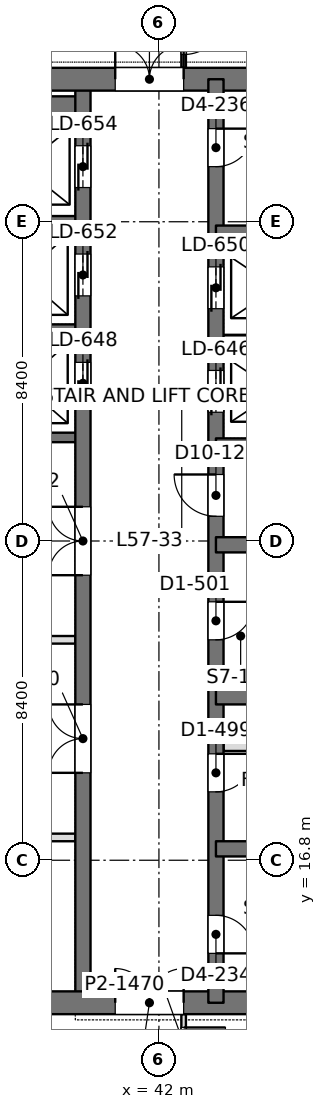
"""IFC4 building model, lengths in metres.
Left out: names, types, materials, properties, quantities, classifications, styles, units other than length and angle.
Written with IfcOpenShell. Run it as: python <this file> out.ifc"""

import sys

from ifc_helpers import new_model, si_unit, direction, frame, frame_2d, origin, place, context, subcontext, project, spatial, rectangle, extrude, element, fill, save


model = new_model("IFC4")
c1 = context("Model", 3, precision=1e-05, world=origin(), true_north=direction((0.0, 1.0)))
c2 = subcontext(c1, "Body", "Model", "MODEL_VIEW")
j1 = project(units=[si_unit("LENGTHUNIT", "METRE"), si_unit("PLANEANGLEUNIT", "RADIAN")], contexts=[c1])
p1 = place(None, origin())
s1 = spatial("IfcSite", under=j1, at=p1, CompositionType="ELEMENT")
p2 = place(p1, origin())
s2 = spatial("IfcBuilding", under=s1, at=p2, CompositionType="ELEMENT")
p3 = place(p2, frame((0.0, 0.0, 250.2)))
s3 = spatial("IfcBuildingStorey", under=s2, at=p3, CompositionType="ELEMENT", Elevation=250.2)
p4 = place(p3, frame((33.75, 13.05, 0.0), z_axis=(0.0, 0.0, 1.0), x_axis=(1.0, 0.0, 0.0)))
e1 = element("IfcWall", 1, at=p4, inside=s3, PredefinedType="SHEAR", context=c2, shape_type="SweptSolid", body=[
    extrude(rectangle(XDim=17.7, YDim=0.6, at=frame_2d((8.85, 0.0))), origin(), (0.0, 0.0, 1.0), 4.5),
])
p5 = place(p4, frame((7.1, 0.0, 0.0)))
e2 = element("IfcOpeningElement", 2, at=p5, cuts=e1, PredefinedType="OPENING", context=c2, shape_type="SweptSolid", body=[
    extrude(rectangle(XDim=1.8, YDim=2.4, at=frame_2d((0.9, 1.2))), frame((0.0, 0.31, 0.0), z_axis=(0.0, -1.0, 0.0), x_axis=(1.0, 0.0, 0.0)), (0.0, 0.0, 1.0), 0.62),
])
p6 = place(p3, frame((33.75, 37.35, 0.0), z_axis=(0.0, 0.0, 1.0), x_axis=(1.0, 0.0, 0.0)))
e3 = element("IfcWall", 3, at=p6, inside=s3, PredefinedType="SHEAR", context=c2, shape_type="SweptSolid", body=[
    extrude(rectangle(XDim=17.7, YDim=0.6, at=frame_2d((8.85, 0.0))), origin(), (0.0, 0.0, 1.0), 4.5),
])
p7 = place(p6, frame((7.1, 0.0, 0.0)))
e4 = element("IfcOpeningElement", 4, at=p7, cuts=e3, PredefinedType="OPENING", context=c2, shape_type="SweptSolid", body=[
    extrude(rectangle(XDim=1.8, YDim=2.4, at=frame_2d((0.9, 1.2))), frame((0.0, 0.31, 0.0), z_axis=(0.0, -1.0, 0.0), x_axis=(1.0, 0.0, 0.0)), (0.0, 0.0, 1.0), 0.62),
])
p8 = place(p3, frame((43.5, 13.05, 0.0), z_axis=(0.0, 0.0, 1.0), x_axis=(0.0, 1.0, 0.0)))
e5 = element("IfcWall", 5, at=p8, inside=s3, PredefinedType="SHEAR", context=c2, shape_type="SweptSolid", body=[
    extrude(rectangle(XDim=24.3, YDim=0.4, at=frame_2d((12.15, 0.0))), origin(), (0.0, 0.0, 1.0), 4.5),
])
p9 = place(p8, frame((1.3, 0.0, 0.0)))
e6 = element("IfcOpeningElement", 6, at=p9, cuts=e5, PredefinedType="OPENING", context=c2, shape_type="SweptSolid", body=[
    extrude(rectangle(XDim=1.0, YDim=2.2, at=frame_2d((0.5, 1.1))), frame((0.0, 0.21, 0.0), z_axis=(0.0, -1.0, 0.0), x_axis=(1.0, 0.0, 0.0)), (0.0, 0.0, 1.0), 0.42),
])
p10 = place(p8, frame((22.0, 0.0, 0.0)))
e7 = element("IfcOpeningElement", 7, at=p10, cuts=e5, PredefinedType="OPENING", context=c2, shape_type="SweptSolid", body=[
    extrude(rectangle(XDim=1.0, YDim=2.2, at=frame_2d((0.5, 1.1))), frame((0.0, 0.21, 0.0), z_axis=(0.0, -1.0, 0.0), x_axis=(1.0, 0.0, 0.0)), (0.0, 0.0, 1.0), 0.42),
])
p11 = place(p8, frame((5.55, 0.0, 0.0)))
e8 = element("IfcOpeningElement", 8, at=p11, cuts=e5, PredefinedType="OPENING", context=c2, shape_type="SweptSolid", body=[
    extrude(rectangle(XDim=1.0, YDim=2.2, at=frame_2d((0.5, 1.1))), frame((0.0, 0.21, 0.0), z_axis=(0.0, -1.0, 0.0), x_axis=(1.0, 0.0, 0.0)), (0.0, 0.0, 1.0), 0.42),
])
p12 = place(p8, frame((9.55, 0.0, 0.0)))
e9 = element("IfcOpeningElement", 9, at=p12, cuts=e5, PredefinedType="OPENING", context=c2, shape_type="SweptSolid", body=[
    extrude(rectangle(XDim=1.0, YDim=2.2, at=frame_2d((0.5, 1.1))), frame((0.0, 0.21, 0.0), z_axis=(0.0, -1.0, 0.0), x_axis=(1.0, 0.0, 0.0)), (0.0, 0.0, 1.0), 0.42),
])
p13 = place(p8, frame((12.8, 0.0, 0.0)))
e10 = element("IfcOpeningElement", 10, at=p13, cuts=e5, PredefinedType="OPENING", context=c2, shape_type="SweptSolid", body=[
    extrude(rectangle(XDim=1.1, YDim=2.2, at=frame_2d((0.55, 1.1))), frame((0.0, 0.21, 0.0), z_axis=(0.0, -1.0, 0.0), x_axis=(1.0, 0.0, 0.0)), (0.0, 0.0, 1.0), 0.42),
])
p14 = place(p8, frame((15.538, 0.0, 0.0)))
e11 = element("IfcOpeningElement", 11, at=p14, cuts=e5, PredefinedType="OPENING", context=c2, shape_type="SweptSolid", body=[
    extrude(rectangle(XDim=1.1, YDim=2.2, at=frame_2d((0.55, 1.1))), frame((0.0, 0.21, 0.0), z_axis=(0.0, -1.0, 0.0), x_axis=(1.0, 0.0, 0.0)), (0.0, 0.0, 1.0), 0.42),
])
p15 = place(p8, frame((18.262, 0.0, 0.0)))
e12 = element("IfcOpeningElement", 12, at=p15, cuts=e5, PredefinedType="OPENING", context=c2, shape_type="SweptSolid", body=[
    extrude(rectangle(XDim=1.1, YDim=2.2, at=frame_2d((0.55, 1.1))), frame((0.0, 0.21, 0.0), z_axis=(0.0, -1.0, 0.0), x_axis=(1.0, 0.0, 0.0)), (0.0, 0.0, 1.0), 0.42),
])
p16 = place(p3, frame((40.0, 13.05, 0.0), z_axis=(0.0, 0.0, 1.0), x_axis=(0.0, 1.0, 0.0)))
e13 = element("IfcWall", 13, at=p16, inside=s3, PredefinedType="SHEAR", context=c2, shape_type="SweptSolid", body=[
    extrude(rectangle(XDim=24.3, YDim=0.4, at=frame_2d((12.15, 0.0))), origin(), (0.0, 0.0, 1.0), 4.5),
])
p17 = place(p16, frame((15.75, 0.0, 0.0)))
e14 = element("IfcOpeningElement", 14, at=p17, cuts=e13, PredefinedType="OPENING", context=c2, shape_type="SweptSolid", body=[
    extrude(rectangle(XDim=1.1, YDim=2.2, at=frame_2d((0.55, 1.1))), frame((0.0, 0.21, 0.0), z_axis=(0.0, -1.0, 0.0), x_axis=(1.0, 0.0, 0.0)), (0.0, 0.0, 1.0), 0.42),
])
p18 = place(p16, frame((18.6, 0.0, 0.0)))
e15 = element("IfcOpeningElement", 15, at=p18, cuts=e13, PredefinedType="OPENING", context=c2, shape_type="SweptSolid", body=[
    extrude(rectangle(XDim=1.1, YDim=2.2, at=frame_2d((0.55, 1.1))), frame((0.0, 0.21, 0.0), z_axis=(0.0, -1.0, 0.0), x_axis=(1.0, 0.0, 0.0)), (0.0, 0.0, 1.0), 0.42),
])
p19 = place(p16, frame((21.45, 0.0, 0.0)))
e16 = element("IfcOpeningElement", 16, at=p19, cuts=e13, PredefinedType="OPENING", context=c2, shape_type="SweptSolid", body=[
    extrude(rectangle(XDim=1.1, YDim=2.2, at=frame_2d((0.55, 1.1))), frame((0.0, 0.21, 0.0), z_axis=(0.0, -1.0, 0.0), x_axis=(1.0, 0.0, 0.0)), (0.0, 0.0, 1.0), 0.42),
])
p20 = place(p16, frame((6.05, 0.0, 0.0)))
e17 = element("IfcOpeningElement", 17, at=p20, cuts=e13, PredefinedType="OPENING", context=c2, shape_type="SweptSolid", body=[
    extrude(rectangle(XDim=1.8, YDim=2.4, at=frame_2d((0.9, 1.2))), frame((0.0, 0.21, 0.0), z_axis=(0.0, -1.0, 0.0), x_axis=(1.0, 0.0, 0.0)), (0.0, 0.0, 1.0), 0.42),
])
p21 = place(p16, frame((11.25, 0.0, 0.0)))
e18 = element("IfcOpeningElement", 18, at=p21, cuts=e13, PredefinedType="OPENING", context=c2, shape_type="SweptSolid", body=[
    extrude(rectangle(XDim=1.8, YDim=2.4, at=frame_2d((0.9, 1.2))), frame((0.0, 0.21, 0.0), z_axis=(0.0, -1.0, 0.0), x_axis=(1.0, 0.0, 0.0)), (0.0, 0.0, 1.0), 0.42),
])
for number, where, z_axis, x_axis in (
    (19, (51.15, 17.1, 0.0), (0.0, 0.0, 1.0), (-1.0, 0.0, 0.0)),
    (20, (51.15, 21.1, 0.0), (0.0, 0.0, 1.0), (-1.0, 0.0, 0.0)),
    (21, (51.15, 25.1, 0.0), (0.0, 0.0, 1.0), (-1.0, 0.0, 0.0)),
    (22, (51.15, 27.7, 0.0), (0.0, 0.0, 1.0), (-1.0, 0.0, 0.0)),
    (23, (51.15, 33.3, 0.0), (0.0, 0.0, 1.0), (-1.0, 0.0, 0.0)),
):
    element("IfcWall", number, at=place(p3, frame(where, z_axis=z_axis, x_axis=x_axis)), inside=s3, PredefinedType="SHEAR", context=c2, shape_type="SweptSolid", body=[
        extrude(rectangle(XDim=7.65, YDim=0.4, at=frame_2d((3.825, 0.0))), origin(), (0.0, 0.0, 1.0), 4.5),
    ])
p22 = place(p3, frame((46.7, 30.5, 0.0), z_axis=(0.0, 0.0, 1.0), x_axis=(-1.0, 0.0, 0.0)))
e24 = element("IfcWall", 24, at=p22, inside=s3, PredefinedType="SHEAR", context=c2, shape_type="SweptSolid", body=[
    extrude(rectangle(XDim=3.2, YDim=0.25, at=frame_2d((1.6, 0.0))), origin(), (0.0, 0.0, 1.0), 4.5),
])
p23 = place(p3, frame((40.0, 27.925, 0.0), z_axis=(0.0, 0.0, 1.0), x_axis=(-1.0, 0.0, 0.0)))
e25 = element("IfcWall", 25, at=p23, inside=s3, PredefinedType="SHEAR", context=c2, shape_type="SweptSolid", body=[
    extrude(rectangle(XDim=5.95, YDim=0.25, at=frame_2d((2.975, 0.0))), origin(), (0.0, 0.0, 1.0), 4.5),
])
for number, where, z_axis, x_axis in (
    (26, (40.0, 30.775, 0.0), (0.0, 0.0, 1.0), (-1.0, 0.0, 0.0)),
    (27, (40.0, 33.625, 0.0), (0.0, 0.0, 1.0), (-1.0, 0.0, 0.0)),
):
    element("IfcWall", number, at=place(p3, frame(where, z_axis=z_axis, x_axis=x_axis)), inside=s3, PredefinedType="SHEAR", context=c2, shape_type="SweptSolid", body=[
        extrude(rectangle(XDim=3.2, YDim=0.25, at=frame_2d((1.6, 0.0))), origin(), (0.0, 0.0, 1.0), 4.5),
    ])
p24 = place(p3, frame((40.0, 36.625, 0.0), z_axis=(0.0, 0.0, 1.0), x_axis=(-1.0, 0.0, 0.0)))
e28 = element("IfcWall", 28, at=p24, inside=s3, PredefinedType="SHEAR", context=c2, shape_type="SweptSolid", body=[
    extrude(rectangle(XDim=3.2, YDim=0.55, at=frame_2d((1.6, 0.0))), origin(), (0.0, 0.0, 1.0), 4.5),
])
p25 = place(p3, frame((33.898, 17.4, 0.0), z_axis=(0.0, 0.0, 1.0), x_axis=(1.0, 0.0, 0.0)))
e29 = element("IfcWall", 29, at=p25, inside=s3, PredefinedType="PARTITIONING", context=c2, shape_type="SweptSolid", body=[
    extrude(rectangle(XDim=5.904, YDim=0.2, at=frame_2d((2.952, 0.0))), origin(), (0.0, 0.0, 1.0), 3.8),
])
p26 = place(p3, frame((34.749, 22.6, 0.0), z_axis=(0.0, 0.0, 1.0), x_axis=(1.0, 0.0, 0.0)))
e30 = element("IfcWall", 30, at=p26, inside=s3, PredefinedType="PARTITIONING", context=c2, shape_type="SweptSolid", body=[
    extrude(rectangle(XDim=5.053, YDim=0.2, at=frame_2d((2.526, 0.0))), origin(), (0.0, 0.0, 1.0), 4.35),
])
p27 = place(p3, frame((42.65, 11.198, 0.0), z_axis=(0.0, 0.0, 1.0), x_axis=(0.0, 1.0, 0.0)))
e31 = element("IfcWall", 31, at=p27, inside=s3, PredefinedType="PARTITIONING", context=c2, shape_type="SweptSolid", body=[
    extrude(rectangle(XDim=1.554, YDim=0.12, at=frame_2d((0.777, 0.0))), origin(), (0.0, 0.0, 1.0), 4.35),
])
p28 = place(p27, frame((0.102, 0.0, 0.0)))
e32 = element("IfcOpeningElement", 32, at=p28, cuts=e31, PredefinedType="OPENING", context=c2, shape_type="SweptSolid", body=[
    extrude(rectangle(XDim=1.1, YDim=2.4, at=frame_2d((0.55, 1.2))), frame((0.0, 0.07, 0.0), z_axis=(0.0, -1.0, 0.0), x_axis=(1.0, 0.0, 0.0)), (0.0, 0.0, 1.0), 0.14),
])
p29 = place(p3, frame((42.65, 37.648, 0.0), z_axis=(0.0, 0.0, 1.0), x_axis=(0.0, 1.0, 0.0)))
e33 = element("IfcWall", 33, at=p29, inside=s3, PredefinedType="PARTITIONING", context=c2, shape_type="SweptSolid", body=[
    extrude(rectangle(XDim=1.554, YDim=0.12, at=frame_2d((0.777, 0.0))), origin(), (0.0, 0.0, 1.0), 4.35),
])
p30 = place(p29, frame((0.352, 0.0, 0.0)))
e34 = element("IfcOpeningElement", 34, at=p30, cuts=e33, PredefinedType="OPENING", context=c2, shape_type="SweptSolid", body=[
    extrude(rectangle(XDim=1.1, YDim=2.4, at=frame_2d((0.55, 1.2))), frame((0.0, 0.07, 0.0), z_axis=(0.0, -1.0, 0.0), x_axis=(1.0, 0.0, 0.0)), (0.0, 0.0, 1.0), 0.14),
])
p31 = place(p3, frame((43.7, 19.8, 0.0), z_axis=(0.0, 0.0, 1.0), x_axis=(1.0, 0.0, 0.0)))
e35 = element("IfcWall", 35, at=p31, inside=s3, PredefinedType="PARTITIONING", context=c2, shape_type="SweptSolid", body=[
    extrude(rectangle(XDim=6.75, YDim=0.25, at=frame_2d((3.375, 0.0))), origin(), (0.0, 0.0, 1.0), 4.3),
])
p32 = place(p31, frame((2.9, 0.0, 0.0)))
e36 = element("IfcOpeningElement", 36, at=p32, cuts=e35, PredefinedType="OPENING", context=c2, shape_type="SweptSolid", body=[
    extrude(rectangle(XDim=0.9, YDim=2.2, at=frame_2d((0.45, 1.1))), frame((0.0, 0.135, 0.0), z_axis=(0.0, -1.0, 0.0), x_axis=(1.0, 0.0, 0.0)), (0.0, 0.0, 1.0), 0.27),
])
p33 = place(p5, origin())
e37 = element("IfcDoor", 37, at=p33, inside=s3, OperationType="DOUBLE_DOOR_SINGLE_SWING", PredefinedType="DOOR", context=c2, shape_type="SweptSolid", body=[
    extrude(rectangle(XDim=1.8, YDim=2.4, at=frame_2d((0.9, 1.2))), frame((0.0, 0.025, 0.0), z_axis=(0.0, -1.0, 0.0), x_axis=(1.0, 0.0, 0.0)), (0.0, 0.0, 1.0), 0.05),
])
fill(e2, e37)
p34 = place(p7, origin())
e38 = element("IfcDoor", 38, at=p34, inside=s3, OperationType="DOUBLE_DOOR_SINGLE_SWING", PredefinedType="DOOR", context=c2, shape_type="SweptSolid", body=[
    extrude(rectangle(XDim=1.8, YDim=2.4, at=frame_2d((0.9, 1.2))), frame((0.0, 0.025, 0.0), z_axis=(0.0, -1.0, 0.0), x_axis=(1.0, 0.0, 0.0)), (0.0, 0.0, 1.0), 0.05),
])
fill(e4, e38)
p35 = place(p9, frame((1.0, 0.0, 0.0), z_axis=(0.0, 0.0, 1.0), x_axis=(-1.0, 0.0, 0.0)))
e39 = element("IfcDoor", 39, at=p35, inside=s3, OperationType="SINGLE_SWING_RIGHT", PredefinedType="DOOR", context=c2, shape_type="SweptSolid", body=[
    extrude(rectangle(XDim=1.0, YDim=2.2, at=frame_2d((0.5, 1.1))), frame((0.0, 0.025, 0.0), z_axis=(0.0, -1.0, 0.0), x_axis=(1.0, 0.0, 0.0)), (0.0, 0.0, 1.0), 0.05),
])
fill(e6, e39)
p36 = place(p10, frame((1.0, 0.0, 0.0), z_axis=(0.0, 0.0, 1.0), x_axis=(-1.0, 0.0, 0.0)))
e40 = element("IfcDoor", 40, at=p36, inside=s3, OperationType="SINGLE_SWING_LEFT", PredefinedType="DOOR", context=c2, shape_type="SweptSolid", body=[
    extrude(rectangle(XDim=1.0, YDim=2.2, at=frame_2d((0.5, 1.1))), frame((0.0, 0.025, 0.0), z_axis=(0.0, -1.0, 0.0), x_axis=(1.0, 0.0, 0.0)), (0.0, 0.0, 1.0), 0.05),
])
fill(e7, e40)
p37 = place(p11, frame((1.0, 0.0, 0.0), z_axis=(0.0, 0.0, 1.0), x_axis=(-1.0, 0.0, 0.0)))
e41 = element("IfcDoor", 41, at=p37, inside=s3, OperationType="SINGLE_SWING_LEFT", PredefinedType="DOOR", context=c2, shape_type="SweptSolid", body=[
    extrude(rectangle(XDim=1.0, YDim=2.2, at=frame_2d((0.5, 1.1))), frame((0.0, 0.025, 0.0), z_axis=(0.0, -1.0, 0.0), x_axis=(1.0, 0.0, 0.0)), (0.0, 0.0, 1.0), 0.05),
])
fill(e8, e41)
p38 = place(p12, frame((1.0, 0.0, 0.0), z_axis=(0.0, 0.0, 1.0), x_axis=(-1.0, 0.0, 0.0)))
e42 = element("IfcDoor", 42, at=p38, inside=s3, OperationType="SINGLE_SWING_LEFT", PredefinedType="DOOR", context=c2, shape_type="SweptSolid", body=[
    extrude(rectangle(XDim=1.0, YDim=2.2, at=frame_2d((0.5, 1.1))), frame((0.0, 0.025, 0.0), z_axis=(0.0, -1.0, 0.0), x_axis=(1.0, 0.0, 0.0)), (0.0, 0.0, 1.0), 0.05),
])
fill(e9, e42)
p39 = place(p13, origin())
e43 = element("IfcDoor", 43, at=p39, inside=s3, OperationType="SINGLE_SWING_RIGHT", PredefinedType="DOOR", context=c2, shape_type="SweptSolid", body=[
    extrude(rectangle(XDim=1.1, YDim=2.2, at=frame_2d((0.55, 1.1))), frame((0.0, 0.025, 0.0), z_axis=(0.0, -1.0, 0.0), x_axis=(1.0, 0.0, 0.0)), (0.0, 0.0, 1.0), 0.05),
])
fill(e10, e43)
p40 = place(p17, origin())
e44 = element("IfcDoor", 44, at=p40, inside=s3, OperationType="DOUBLE_DOOR_SLIDING", PredefinedType="DOOR", context=c2, shape_type="SweptSolid", body=[
    extrude(rectangle(XDim=1.1, YDim=2.2, at=frame_2d((0.55, 1.1))), frame((0.0, 0.025, 0.0), z_axis=(0.0, -1.0, 0.0), x_axis=(1.0, 0.0, 0.0)), (0.0, 0.0, 1.0), 0.05),
])
fill(e14, e44)
p41 = place(p18, origin())
e45 = element("IfcDoor", 45, at=p41, inside=s3, OperationType="DOUBLE_DOOR_SLIDING", PredefinedType="DOOR", context=c2, shape_type="SweptSolid", body=[
    extrude(rectangle(XDim=1.1, YDim=2.2, at=frame_2d((0.55, 1.1))), frame((0.0, 0.025, 0.0), z_axis=(0.0, -1.0, 0.0), x_axis=(1.0, 0.0, 0.0)), (0.0, 0.0, 1.0), 0.05),
])
fill(e15, e45)
p42 = place(p19, origin())
e46 = element("IfcDoor", 46, at=p42, inside=s3, OperationType="DOUBLE_DOOR_SLIDING", PredefinedType="DOOR", context=c2, shape_type="SweptSolid", body=[
    extrude(rectangle(XDim=1.1, YDim=2.2, at=frame_2d((0.55, 1.1))), frame((0.0, 0.025, 0.0), z_axis=(0.0, -1.0, 0.0), x_axis=(1.0, 0.0, 0.0)), (0.0, 0.0, 1.0), 0.05),
])
fill(e16, e46)
p43 = place(p14, origin())
e47 = element("IfcDoor", 47, at=p43, inside=s3, OperationType="DOUBLE_DOOR_SLIDING", PredefinedType="DOOR", context=c2, shape_type="SweptSolid", body=[
    extrude(rectangle(XDim=1.1, YDim=2.2, at=frame_2d((0.55, 1.1))), frame((0.0, 0.025, 0.0), z_axis=(0.0, -1.0, 0.0), x_axis=(1.0, 0.0, 0.0)), (0.0, 0.0, 1.0), 0.05),
])
fill(e11, e47)
p44 = place(p15, origin())
e48 = element("IfcDoor", 48, at=p44, inside=s3, OperationType="DOUBLE_DOOR_SLIDING", PredefinedType="DOOR", context=c2, shape_type="SweptSolid", body=[
    extrude(rectangle(XDim=1.1, YDim=2.2, at=frame_2d((0.55, 1.1))), frame((0.0, 0.025, 0.0), z_axis=(0.0, -1.0, 0.0), x_axis=(1.0, 0.0, 0.0)), (0.0, 0.0, 1.0), 0.05),
])
fill(e12, e48)
p45 = place(p20, origin())
e49 = element("IfcDoor", 49, at=p45, inside=s3, OperationType="DOUBLE_DOOR_SINGLE_SWING", PredefinedType="DOOR", context=c2, shape_type="SweptSolid", body=[
    extrude(rectangle(XDim=1.8, YDim=2.4, at=frame_2d((0.9, 1.2))), frame((0.0, 0.025, 0.0), z_axis=(0.0, -1.0, 0.0), x_axis=(1.0, 0.0, 0.0)), (0.0, 0.0, 1.0), 0.05),
])
fill(e17, e49)
p46 = place(p21, origin())
e50 = element("IfcDoor", 50, at=p46, inside=s3, OperationType="DOUBLE_DOOR_SINGLE_SWING", PredefinedType="DOOR", context=c2, shape_type="SweptSolid", body=[
    extrude(rectangle(XDim=1.8, YDim=2.4, at=frame_2d((0.9, 1.2))), frame((0.0, 0.025, 0.0), z_axis=(0.0, -1.0, 0.0), x_axis=(1.0, 0.0, 0.0)), (0.0, 0.0, 1.0), 0.05),
])
fill(e18, e50)
p47 = place(p28, frame((1.1, 0.0, 0.0), z_axis=(0.0, 0.0, 1.0), x_axis=(-1.0, 0.0, 0.0)))
e51 = element("IfcDoor", 51, at=p47, inside=s3, OperationType="SINGLE_SWING_LEFT", PredefinedType="DOOR", context=c2, shape_type="SweptSolid", body=[
    extrude(rectangle(XDim=1.1, YDim=2.4, at=frame_2d((0.55, 1.2))), frame((0.0, 0.025, 0.0), z_axis=(0.0, -1.0, 0.0), x_axis=(1.0, 0.0, 0.0)), (0.0, 0.0, 1.0), 0.05),
])
fill(e32, e51)
p48 = place(p30, frame((1.1, 0.0, 0.0), z_axis=(0.0, 0.0, 1.0), x_axis=(-1.0, 0.0, 0.0)))
e52 = element("IfcDoor", 52, at=p48, inside=s3, OperationType="SINGLE_SWING_LEFT", PredefinedType="DOOR", context=c2, shape_type="SweptSolid", body=[
    extrude(rectangle(XDim=1.1, YDim=2.4, at=frame_2d((0.55, 1.2))), frame((0.0, 0.025, 0.0), z_axis=(0.0, -1.0, 0.0), x_axis=(1.0, 0.0, 0.0)), (0.0, 0.0, 1.0), 0.05),
])
fill(e34, e52)
save(model, sys.argv[1])
